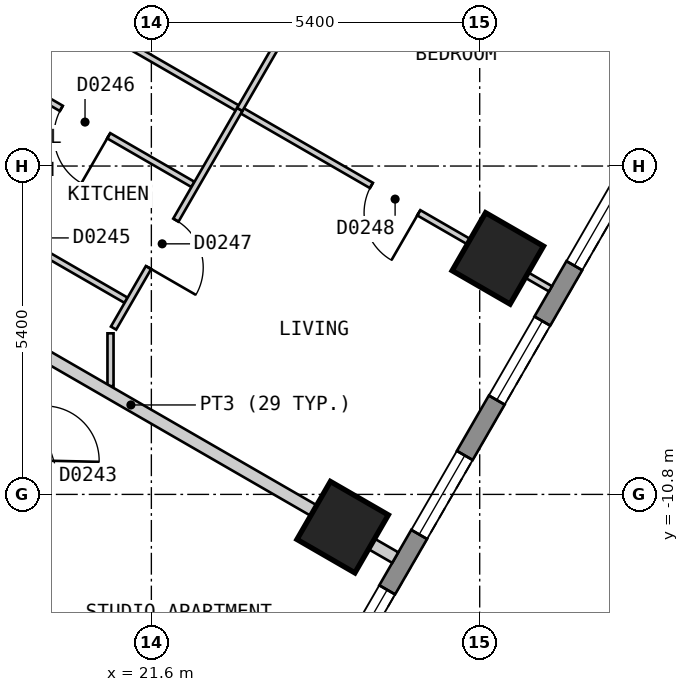
"""IFC4 building model, lengths in metres.
Left out: names, types, materials, properties, quantities, classifications, styles, units other than length and angle.
Written with IfcOpenShell. Run it as: python <this file> out.ifc"""

import sys

from ifc_helpers import new_model, si_unit, direction, frame, frame_2d, origin, origin_2d, place, context, subcontext, project, spatial, polyline, rectangle, outline, extrude, element, fill, save


model = new_model("IFC4")
c1 = context("Model", 3, precision=1e-05, world=origin(), true_north=direction((0.0, 1.0)))
c2 = subcontext(c1, "Body", "Model", "MODEL_VIEW")
j1 = project(units=[si_unit("LENGTHUNIT", "METRE"), si_unit("PLANEANGLEUNIT", "RADIAN")], contexts=[c1])
p1 = place(None, origin())
s1 = spatial("IfcSite", under=j1, at=p1, CompositionType="ELEMENT")
p2 = place(p1, origin())
s2 = spatial("IfcBuilding", under=s1, at=p2, CompositionType="ELEMENT")
p3 = place(p2, frame((0.0, 0.0, 47.4)))
s3 = spatial("IfcBuildingStorey", under=s2, at=p3, CompositionType="ELEMENT", Elevation=47.4)
for number, where, z_axis, x_axis in (
    (1, (24.746, -11.339, 0.0), (0.0, 0.0, 1.0), (0.5, 0.866, 0.0)),
    (2, (27.298, -6.919, 0.0), (0.0, 0.0, 1.0), (0.5, 0.866, 0.0)),
):
    element("IfcColumn", number, at=place(p3, frame(where, z_axis=z_axis, x_axis=x_axis)), inside=s3, PredefinedType="COLUMN", context=c2, shape_type="SweptSolid", body=[
        extrude(rectangle(XDim=1.1, YDim=1.1, at=origin_2d()), origin(), (0.0, 0.0, 1.0), 3.0),
    ])
p4 = place(p3, frame((17.71, -25.825, 0.0), z_axis=(0.0, 0.0, 1.0), x_axis=(0.500001938803, 0.866024284413, 0.0)))
e3 = element("IfcWall", 3, at=p4, inside=s3, PredefinedType="SOLIDWALL", context=c2, shape_type="SweptSolid", body=[
    extrude(outline(polyline([(0.0, -0.15), (27.02, -0.15), (26.94, 0.15), (0.08, 0.15), (0.0, -0.15)])), origin(), (0.0, 0.0, 1.0), 2.7),
])
p5 = place(p4, frame((1.277, 0.0, 0.15)))
e4 = element("IfcOpeningElement", 4, at=p5, cuts=e3, PredefinedType="OPENING", context=c2, shape_type="SweptSolid", body=[
    extrude(rectangle(XDim=1.5, YDim=2.1, at=frame_2d((0.75, 1.05))), frame((0.0, 0.16, 0.0), z_axis=(0.0, -1.0, 0.0), x_axis=(1.0, 0.0, 0.0)), (0.0, 0.0, 1.0), 0.32),
])
p6 = place(p4, frame((3.829, 0.0, 0.15)))
e5 = element("IfcOpeningElement", 5, at=p6, cuts=e3, PredefinedType="OPENING", context=c2, shape_type="SweptSolid", body=[
    extrude(rectangle(XDim=1.5, YDim=2.1, at=frame_2d((0.75, 1.05))), frame((0.0, 0.16, 0.0), z_axis=(0.0, -1.0, 0.0), x_axis=(1.0, 0.0, 0.0)), (0.0, 0.0, 1.0), 0.32),
])
p7 = place(p4, frame((6.382, 0.0, 0.15)))
e6 = element("IfcOpeningElement", 6, at=p7, cuts=e3, PredefinedType="OPENING", context=c2, shape_type="SweptSolid", body=[
    extrude(rectangle(XDim=1.5, YDim=2.1, at=frame_2d((0.75, 1.05))), frame((0.0, 0.16, 0.0), z_axis=(0.0, -1.0, 0.0), x_axis=(1.0, 0.0, 0.0)), (0.0, 0.0, 1.0), 0.32),
])
p8 = place(p4, frame((8.933, 0.0, 0.15)))
e7 = element("IfcOpeningElement", 7, at=p8, cuts=e3, PredefinedType="OPENING", context=c2, shape_type="SweptSolid", body=[
    extrude(rectangle(XDim=1.5, YDim=2.1, at=frame_2d((0.75, 1.05))), frame((0.0, 0.16, 0.0), z_axis=(0.0, -1.0, 0.0), x_axis=(1.0, 0.0, 0.0)), (0.0, 0.0, 1.0), 0.32),
])
p9 = place(p4, frame((11.485, 0.0, 0.15)))
e8 = element("IfcOpeningElement", 8, at=p9, cuts=e3, PredefinedType="OPENING", context=c2, shape_type="SweptSolid", body=[
    extrude(rectangle(XDim=1.5, YDim=2.1, at=frame_2d((0.75, 1.05))), frame((0.0, 0.16, 0.0), z_axis=(0.0, -1.0, 0.0), x_axis=(1.0, 0.0, 0.0)), (0.0, 0.0, 1.0), 0.32),
])
p10 = place(p4, frame((14.037, 0.0, 0.15)))
e9 = element("IfcOpeningElement", 9, at=p10, cuts=e3, PredefinedType="OPENING", context=c2, shape_type="SweptSolid", body=[
    extrude(rectangle(XDim=1.5, YDim=2.1, at=frame_2d((0.75, 1.05))), frame((0.0, 0.16, 0.0), z_axis=(0.0, -1.0, 0.0), x_axis=(1.0, 0.0, 0.0)), (0.0, 0.0, 1.0), 0.32),
])
p11 = place(p4, frame((16.589, 0.0, 0.15)))
e10 = element("IfcOpeningElement", 10, at=p11, cuts=e3, PredefinedType="OPENING", context=c2, shape_type="SweptSolid", body=[
    extrude(rectangle(XDim=1.5, YDim=2.1, at=frame_2d((0.75, 1.05))), frame((0.0, 0.16, 0.0), z_axis=(0.0, -1.0, 0.0), x_axis=(1.0, 0.0, 0.0)), (0.0, 0.0, 1.0), 0.32),
])
p12 = place(p4, frame((19.141, 0.0, 0.15)))
e11 = element("IfcOpeningElement", 11, at=p12, cuts=e3, PredefinedType="OPENING", context=c2, shape_type="SweptSolid", body=[
    extrude(rectangle(XDim=1.5, YDim=2.1, at=frame_2d((0.75, 1.05))), frame((0.0, 0.16, 0.0), z_axis=(0.0, -1.0, 0.0), x_axis=(1.0, 0.0, 0.0)), (0.0, 0.0, 1.0), 0.32),
])
p13 = place(p4, frame((21.693, 0.0, 0.15)))
e12 = element("IfcOpeningElement", 12, at=p13, cuts=e3, PredefinedType="OPENING", context=c2, shape_type="SweptSolid", body=[
    extrude(rectangle(XDim=1.5, YDim=2.1, at=frame_2d((0.75, 1.05))), frame((0.0, 0.16, 0.0), z_axis=(0.0, -1.0, 0.0), x_axis=(1.0, 0.0, 0.0)), (0.0, 0.0, 1.0), 0.32),
])
p14 = place(p4, frame((24.244, 0.0, 0.15)))
e13 = element("IfcOpeningElement", 13, at=p14, cuts=e3, PredefinedType="OPENING", context=c2, shape_type="SweptSolid", body=[
    extrude(rectangle(XDim=1.5, YDim=2.1, at=frame_2d((0.75, 1.05))), frame((0.0, 0.16, 0.0), z_axis=(0.0, -1.0, 0.0), x_axis=(1.0, 0.0, 0.0)), (0.0, 0.0, 1.0), 0.32),
])
p15 = place(p3, frame((16.864, -6.789, 0.0), z_axis=(0.0, 0.0, 1.0), x_axis=(0.500058020612, 0.865991902977, 0.0)))
e14 = element("IfcWall", 14, at=p15, inside=s3, PredefinedType="PARTITIONING", context=c2, shape_type="SweptSolid", body=[
    extrude(rectangle(XDim=7.725, YDim=0.2, at=frame_2d((3.863, 0.0))), origin(), (0.0, 0.0, 1.0), 2.7),
])
p16 = place(p15, frame((2.052, 0.0, 0.0)))
e15 = element("IfcOpeningElement", 15, at=p16, cuts=e14, PredefinedType="OPENING", context=c2, shape_type="SweptSolid", body=[
    extrude(rectangle(XDim=1.0, YDim=2.1, at=frame_2d((0.5, 1.05))), frame((0.0, 0.11, 0.0), z_axis=(0.0, -1.0, 0.0), x_axis=(1.0, 0.0, 0.0)), (0.0, 0.0, 1.0), 0.22),
])
p17 = place(p3, frame((17.677, -5.582, 0.0), z_axis=(0.0, 0.0, 1.0), x_axis=(0.866015917575, -0.500016430238, 0.0)))
e16 = element("IfcWall", 16, at=p17, inside=s3, PredefinedType="PARTITIONING", context=c2, shape_type="SweptSolid", body=[
    extrude(rectangle(XDim=4.05, YDim=0.1, at=frame_2d((2.025, 0.0))), origin(), (0.0, 0.0, 1.0), 2.7),
])
p18 = place(p17, frame((1.6, 0.0, 0.0)))
e17 = element("IfcOpeningElement", 17, at=p18, cuts=e16, PredefinedType="OPENING", context=c2, shape_type="SweptSolid", body=[
    extrude(rectangle(XDim=0.8, YDim=2.1, at=frame_2d((0.4, 1.05))), frame((0.0, 0.06, 0.0), z_axis=(0.0, -1.0, 0.0), x_axis=(1.0, 0.0, 0.0)), (0.0, 0.0, 1.0), 0.12),
])
p19 = place(p3, frame((18.777, -3.677, 0.0), z_axis=(0.0, 0.0, 1.0), x_axis=(0.866000843773, -0.500042536776, 0.0)))
e18 = element("IfcWall", 18, at=p19, inside=s3, PredefinedType="PARTITIONING", context=c2, shape_type="SweptSolid", body=[
    extrude(rectangle(XDim=4.05, YDim=0.1, at=frame_2d((2.025, 0.0))), origin(), (0.0, 0.0, 1.0), 2.7),
])
p20 = place(p19, frame((1.55, 0.0, 0.0)))
e19 = element("IfcOpeningElement", 19, at=p20, cuts=e18, PredefinedType="OPENING", context=c2, shape_type="SweptSolid", body=[
    extrude(rectangle(XDim=0.9, YDim=2.1, at=frame_2d((0.45, 1.05))), frame((0.0, 0.06, 0.0), z_axis=(0.0, -1.0, 0.0), x_axis=(1.0, 0.0, 0.0)), (0.0, 0.0, 1.0), 0.12),
])
p21 = place(p3, frame((19.503, -2.419, 0.0), z_axis=(0.0, 0.0, 1.0), x_axis=(0.866047370643, -0.499961950354, 0.0)))
e20 = element("IfcWall", 20, at=p21, inside=s3, PredefinedType="PARTITIONING", context=c2, shape_type="SweptSolid", body=[
    extrude(rectangle(XDim=10.001, YDim=0.1, at=frame_2d((5.0, 0.0))), origin(), (0.0, 0.0, 1.0), 2.7),
])
p22 = place(p21, frame((6.6, 0.0, 0.0)))
e21 = element("IfcOpeningElement", 21, at=p22, cuts=e20, PredefinedType="OPENING", context=c2, shape_type="SweptSolid", body=[
    extrude(rectangle(XDim=0.9, YDim=2.1, at=frame_2d((0.45, 1.05))), frame((0.0, 0.06, 0.0), z_axis=(0.0, -1.0, 0.0), x_axis=(1.0, 0.0, 0.0)), (0.0, 0.0, 1.0), 0.12),
])
p23 = place(p3, frame((20.978, -8.065, 0.0), z_axis=(0.0, 0.0, 1.0), x_axis=(0.499965068118, 0.866045570776, 0.0)))
e22 = element("IfcWall", 22, at=p23, inside=s3, PredefinedType="PARTITIONING", context=c2, shape_type="SweptSolid", body=[
    extrude(rectangle(XDim=4.152, YDim=0.1, at=frame_2d((2.076, 0.0))), origin(), (0.0, 0.0, 1.0), 2.7),
])
p24 = place(p23, frame((1.15, 0.0, 0.0)))
e23 = element("IfcOpeningElement", 23, at=p24, cuts=e22, PredefinedType="OPENING", context=c2, shape_type="SweptSolid", body=[
    extrude(rectangle(XDim=0.9, YDim=2.1, at=frame_2d((0.45, 1.05))), frame((0.0, 0.06, 0.0), z_axis=(0.0, -1.0, 0.0), x_axis=(1.0, 0.0, 0.0)), (0.0, 0.0, 1.0), 0.12),
])
p25 = place(p3, frame((20.928, -9.02, 0.0), z_axis=(0.0, 0.0, 1.0), x_axis=(0.0, 1.0, 0.0)))
e24 = element("IfcWall", 24, at=p25, inside=s3, PredefinedType="PARTITIONING", context=c2, shape_type="SweptSolid", body=[
    extrude(rectangle(XDim=0.869, YDim=0.1, at=frame_2d((0.435, 0.0))), origin(), (0.0, 0.0, 1.0), 2.7),
])
p26 = place(p3, frame((16.788, -12.638, 0.0), z_axis=(0.0, 0.0, 1.0), x_axis=(0.866027278279, -0.499996753267, 0.0)))
e25 = element("IfcWall", 25, at=p26, inside=s3, PredefinedType="PARTITIONING", context=c2, shape_type="SweptSolid", body=[
    extrude(rectangle(XDim=7.242, YDim=0.2, at=frame_2d((3.621, 0.0))), origin(), (0.0, 0.0, 1.0), 2.7),
])
p27 = place(p3, frame((16.916, -6.819, 0.0), z_axis=(0.0, 0.0, 1.0), x_axis=(0.866028876723, -0.499993984646, 0.0)))
e26 = element("IfcWall", 26, at=p27, inside=s3, PredefinedType="PARTITIONING", context=c2, shape_type="SweptSolid", body=[
    extrude(rectangle(XDim=10.04, YDim=0.2, at=frame_2d((5.02, 0.0))), origin(), (0.0, 0.0, 1.0), 2.7),
])
p28 = place(p3, frame((23.054, -4.469, 0.0), z_axis=(0.0, 0.0, 1.0), x_axis=(0.500023345639, 0.866011924754, 0.0)))
e27 = element("IfcWall", 27, at=p28, inside=s3, PredefinedType="PARTITIONING", context=c2, shape_type="SweptSolid", body=[
    extrude(rectangle(XDim=5.104, YDim=0.1, at=frame_2d((2.552, 0.0))), origin(), (0.0, 0.0, 1.0), 2.7),
])
p29 = place(p28, frame((2.152, 0.0, 0.0)))
e28 = element("IfcOpeningElement", 28, at=p29, cuts=e27, PredefinedType="OPENING", context=c2, shape_type="SweptSolid", body=[
    extrude(rectangle(XDim=0.8, YDim=2.1, at=frame_2d((0.4, 1.05))), frame((0.0, 0.06, 0.0), z_axis=(0.0, -1.0, 0.0), x_axis=(1.0, 0.0, 0.0)), (0.0, 0.0, 1.0), 0.12),
])
p30 = place(p10, origin())
e29 = element("IfcWindow", 29, at=p30, inside=s3, PartitioningType="SINGLE_PANEL", PredefinedType="WINDOW", context=c2, shape_type="SweptSolid", body=[
    extrude(rectangle(XDim=1.5, YDim=2.1, at=frame_2d((0.75, 1.05))), frame((0.0, 0.03, 0.0), z_axis=(0.0, -1.0, 0.0), x_axis=(1.0, 0.0, 0.0)), (0.0, 0.0, 1.0), 0.06),
])
fill(e9, e29)
p31 = place(p11, origin())
e30 = element("IfcWindow", 30, at=p31, inside=s3, PartitioningType="SINGLE_PANEL", PredefinedType="WINDOW", context=c2, shape_type="SweptSolid", body=[
    extrude(rectangle(XDim=1.5, YDim=2.1, at=frame_2d((0.75, 1.05))), frame((0.0, 0.03, 0.0), z_axis=(0.0, -1.0, 0.0), x_axis=(1.0, 0.0, 0.0)), (0.0, 0.0, 1.0), 0.06),
])
fill(e10, e30)
p32 = place(p12, origin())
e31 = element("IfcWindow", 31, at=p32, inside=s3, PartitioningType="SINGLE_PANEL", PredefinedType="WINDOW", context=c2, shape_type="SweptSolid", body=[
    extrude(rectangle(XDim=1.5, YDim=2.1, at=frame_2d((0.75, 1.05))), frame((0.0, 0.03, 0.0), z_axis=(0.0, -1.0, 0.0), x_axis=(1.0, 0.0, 0.0)), (0.0, 0.0, 1.0), 0.06),
])
fill(e11, e31)
p33 = place(p13, origin())
e32 = element("IfcWindow", 32, at=p33, inside=s3, PartitioningType="SINGLE_PANEL", PredefinedType="WINDOW", context=c2, shape_type="SweptSolid", body=[
    extrude(rectangle(XDim=1.5, YDim=2.1, at=frame_2d((0.75, 1.05))), frame((0.0, 0.03, 0.0), z_axis=(0.0, -1.0, 0.0), x_axis=(1.0, 0.0, 0.0)), (0.0, 0.0, 1.0), 0.06),
])
fill(e12, e32)
p34 = place(p20, origin())
e33 = element("IfcDoor", 33, at=p34, inside=s3, OperationType="SINGLE_SWING_RIGHT", PredefinedType="DOOR", context=c2, shape_type="SweptSolid", body=[
    extrude(rectangle(XDim=0.9, YDim=2.1, at=frame_2d((0.45, 1.05))), frame((0.0, 0.025, 0.0), z_axis=(0.0, -1.0, 0.0), x_axis=(1.0, 0.0, 0.0)), (0.0, 0.0, 1.0), 0.05),
])
fill(e19, e33)
p35 = place(p24, origin())
e34 = element("IfcDoor", 34, at=p35, inside=s3, OperationType="SINGLE_SWING_LEFT", PredefinedType="DOOR", context=c2, shape_type="SweptSolid", body=[
    extrude(rectangle(XDim=0.9, YDim=2.1, at=frame_2d((0.45, 1.05))), frame((0.0, 0.025, 0.0), z_axis=(0.0, -1.0, 0.0), x_axis=(1.0, 0.0, 0.0)), (0.0, 0.0, 1.0), 0.05),
])
fill(e23, e34)
p36 = place(p22, origin())
e35 = element("IfcDoor", 35, at=p36, inside=s3, OperationType="SINGLE_SWING_RIGHT", PredefinedType="DOOR", context=c2, shape_type="SweptSolid", body=[
    extrude(rectangle(XDim=0.9, YDim=2.1, at=frame_2d((0.45, 1.05))), frame((0.0, 0.025, 0.0), z_axis=(0.0, -1.0, 0.0), x_axis=(1.0, 0.0, 0.0)), (0.0, 0.0, 1.0), 0.05),
])
fill(e21, e35)
save(model, sys.argv[1])
